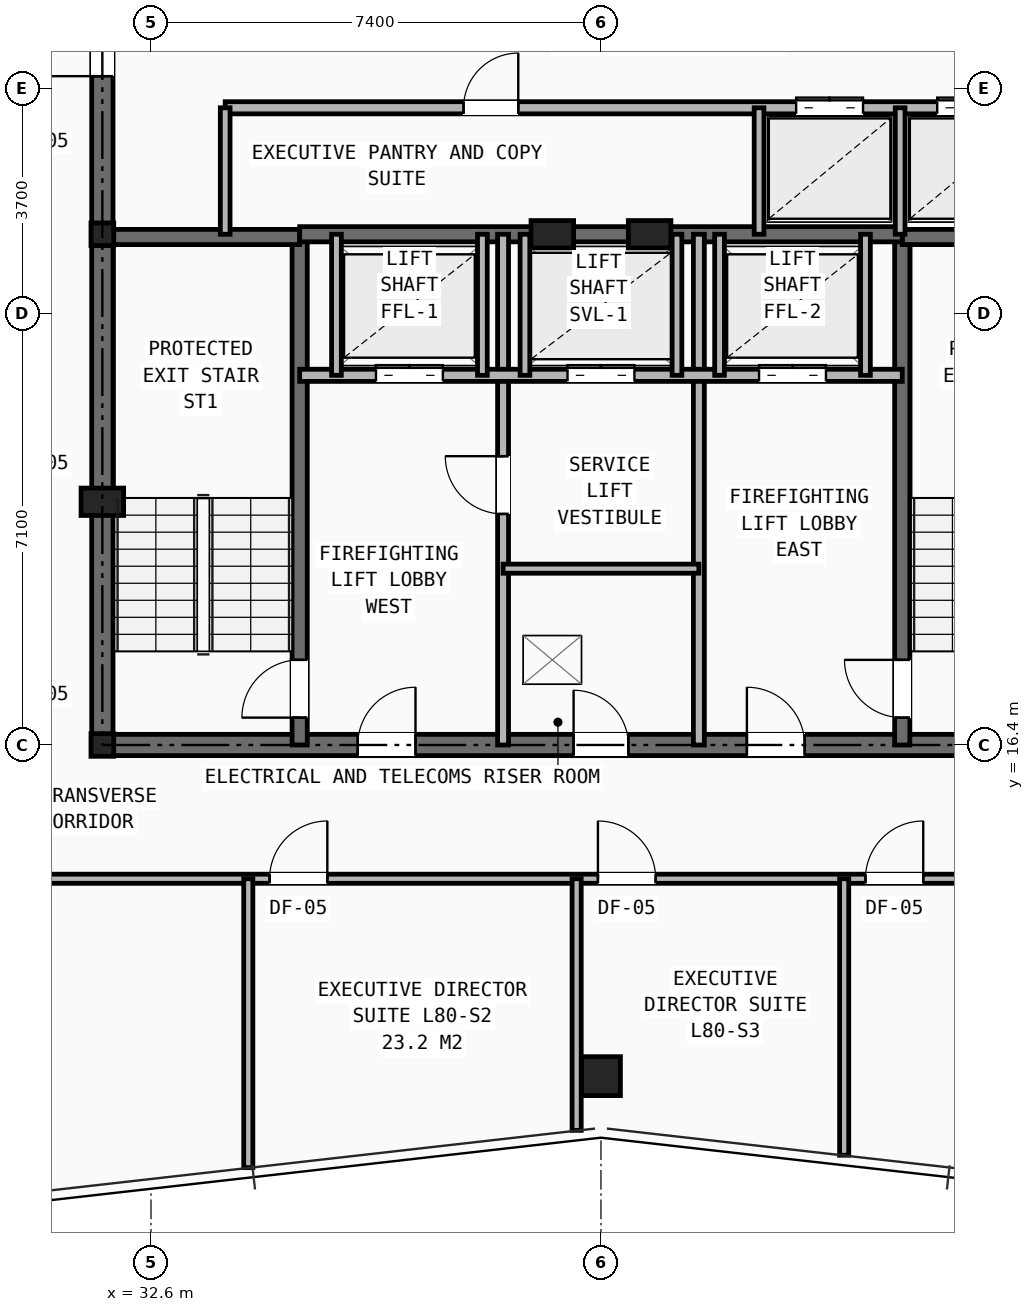
"""IFC4 building model, lengths in metres.
Left out: names, types, materials, properties, quantities, classifications, styles, units other than length and angle.
Written with IfcOpenShell. Run it as: python <this file> out.ifc"""

import sys

from ifc_helpers import new_model, si_unit, direction, frame, frame_2d, origin, origin_2d, place, context, subcontext, project, spatial, rectangle, hollow_rectangle, i_section, extrude, element, fill, save


model = new_model("IFC4")
c1 = context("Model", 3, precision=1e-05, world=origin(), true_north=direction((0.0, 1.0)))
c2 = subcontext(c1, "Body", "Model", "MODEL_VIEW")
j1 = project(units=[si_unit("LENGTHUNIT", "METRE"), si_unit("PLANEANGLEUNIT", "RADIAN")], contexts=[c1])
p1 = place(None, origin())
s1 = spatial("IfcSite", under=j1, at=p1, CompositionType="ELEMENT")
p2 = place(p1, origin())
s2 = spatial("IfcBuilding", under=s1, at=p2, CompositionType="ELEMENT")
p3 = place(p2, frame((0.0, 0.0, 283.0)))
s3 = spatial("IfcBuildingStorey", under=s2, at=p3, CompositionType="ELEMENT", Elevation=283.0)
for number, where, z_axis, x_axis in (
    (1, (31.8, 16.4, 0.0), (0.0, 0.0, 1.0), (1.0, 0.0, 0.0)),
    (2, (31.8, 24.8, 0.0), (0.0, 0.0, 1.0), (1.0, 0.0, 0.0)),
):
    element("IfcColumn", number, at=place(p3, frame(where, z_axis=z_axis, x_axis=x_axis)), inside=s3, PredefinedType="COLUMN", context=c2, shape_type="SweptSolid", body=[
        extrude(i_section(OverallWidth=0.374, OverallDepth=0.372, WebThickness=0.016, FlangeThickness=0.026, at=origin_2d()), origin(), (0.0, 0.0, 1.0), 3.5),
    ])
for number, where, z_axis, x_axis in (
    (3, (31.8, 20.4, 0.0), (0.0, 0.0, 1.0), (1.0, 0.0, 0.0)),
    (4, (39.2, 24.8, 0.0), (0.0, 0.0, 1.0), (1.0, 0.0, 0.0)),
    (5, (40.8, 24.8, 0.0), (0.0, 0.0, 1.0), (1.0, 0.0, 0.0)),
):
    element("IfcColumn", number, at=place(p3, frame(where, z_axis=z_axis, x_axis=x_axis)), inside=s3, PredefinedType="PILASTER", context=c2, shape_type="SweptSolid", body=[
        extrude(rectangle(XDim=0.7, YDim=0.45, at=origin_2d()), origin(), (0.0, 0.0, 1.0), 3.5),
    ])
p4 = place(p3, frame((40.0, 10.953, 0.0), z_axis=(0.0, 0.0, 1.0), x_axis=(1.0, 0.0, 0.0)))
e6 = element("IfcColumn", 6, at=p4, inside=s3, PredefinedType="COLUMN", context=c2, shape_type="SweptSolid", body=[
    extrude(hollow_rectangle(XDim=0.64, YDim=0.64, WallThickness=0.045, at=origin_2d()), origin(), (0.0, 0.0, 1.0), 3.5),
])
p5 = place(p3, frame((31.8, 16.4, 0.0), z_axis=(0.0, 0.0, 1.0), x_axis=(1.0, 0.0, 0.0)))
e7 = element("IfcWall", 7, at=p5, inside=s3, PredefinedType="SHEAR", context=c2, shape_type="SweptSolid", body=[
    extrude(rectangle(XDim=16.4, YDim=0.35, at=frame_2d((8.2, 0.0))), origin(), (0.0, 0.0, 1.0), 3.25),
])
p6 = place(p5, frame((7.75, 0.0, 0.0)))
e8 = element("IfcOpeningElement", 8, at=p6, cuts=e7, PredefinedType="OPENING", context=c2, shape_type="SweptSolid", body=[
    extrude(rectangle(XDim=0.9, YDim=2.1, at=frame_2d((0.45, 1.05))), frame((0.0, 0.185, 0.0), z_axis=(0.0, -1.0, 0.0), x_axis=(1.0, 0.0, 0.0)), (0.0, 0.0, 1.0), 0.37),
])
p7 = place(p5, frame((4.2, 0.0, 0.0)))
e9 = element("IfcOpeningElement", 9, at=p7, cuts=e7, PredefinedType="OPENING", context=c2, shape_type="SweptSolid", body=[
    extrude(rectangle(XDim=0.95, YDim=2.1, at=frame_2d((0.475, 1.05))), frame((0.0, 0.185, 0.0), z_axis=(0.0, -1.0, 0.0), x_axis=(1.0, 0.0, 0.0)), (0.0, 0.0, 1.0), 0.37),
])
p8 = place(p5, frame((10.6, 0.0, 0.0)))
e10 = element("IfcOpeningElement", 10, at=p8, cuts=e7, PredefinedType="OPENING", context=c2, shape_type="SweptSolid", body=[
    extrude(rectangle(XDim=0.95, YDim=2.1, at=frame_2d((0.475, 1.05))), frame((0.0, 0.185, 0.0), z_axis=(0.0, -1.0, 0.0), x_axis=(1.0, 0.0, 0.0)), (0.0, 0.0, 1.0), 0.37),
])
p9 = place(p3, frame((31.8, 16.4, 0.0), z_axis=(0.0, 0.0, 1.0), x_axis=(0.0, 1.0, 0.0)))
e11 = element("IfcWall", 11, at=p9, inside=s3, PredefinedType="SHEAR", context=c2, shape_type="SweptSolid", body=[
    extrude(rectangle(XDim=14.8, YDim=0.35, at=frame_2d((7.4, 0.0))), origin(), (0.0, 0.0, 1.0), 3.25),
])
p10 = place(p9, frame((11.0, 0.0, 0.0)))
e12 = element("IfcOpeningElement", 12, at=p10, cuts=e11, PredefinedType="OPENING", context=c2, shape_type="SweptSolid", body=[
    extrude(rectangle(XDim=1.1, YDim=2.15, at=frame_2d((0.55, 1.075))), frame((0.0, 0.185, 0.0), z_axis=(0.0, -1.0, 0.0), x_axis=(1.0, 0.0, 0.0)), (0.0, 0.0, 1.0), 0.37),
])
p11 = place(p3, frame((35.045, 16.4, 0.0), z_axis=(0.0, 0.0, 1.0), x_axis=(0.0, 1.0, 0.0)))
e13 = element("IfcWall", 13, at=p11, inside=s3, PredefinedType="SHEAR", context=c2, shape_type="SweptSolid", body=[
    extrude(rectangle(XDim=8.4, YDim=0.25, at=frame_2d((4.2, 0.0))), origin(), (0.0, 0.0, 1.0), 3.25),
])
p12 = place(p11, frame((0.45, 0.0, 0.0)))
e14 = element("IfcOpeningElement", 14, at=p12, cuts=e13, PredefinedType="OPENING", context=c2, shape_type="SweptSolid", body=[
    extrude(rectangle(XDim=0.95, YDim=2.1, at=frame_2d((0.475, 1.05))), frame((0.0, 0.135, 0.0), z_axis=(0.0, -1.0, 0.0), x_axis=(1.0, 0.0, 0.0)), (0.0, 0.0, 1.0), 0.27),
])
p13 = place(p3, frame((31.8, 24.755, 0.0), z_axis=(0.0, 0.0, 1.0), x_axis=(1.0, 0.0, 0.0)))
e15 = element("IfcWall", 15, at=p13, inside=s3, PredefinedType="SHEAR", context=c2, shape_type="SweptSolid", body=[
    extrude(rectangle(XDim=3.245, YDim=0.25, at=frame_2d((1.623, 0.0))), origin(), (0.0, 0.0, 1.0), 3.25),
])
p14 = place(p3, frame((44.955, 16.4, 0.0), z_axis=(0.0, 0.0, 1.0), x_axis=(0.0, 1.0, 0.0)))
e16 = element("IfcWall", 16, at=p14, inside=s3, PredefinedType="SHEAR", context=c2, shape_type="SweptSolid", body=[
    extrude(rectangle(XDim=8.4, YDim=0.25, at=frame_2d((4.2, 0.0))), origin(), (0.0, 0.0, 1.0), 3.25),
])
p15 = place(p14, frame((0.45, 0.0, 0.0)))
e17 = element("IfcOpeningElement", 17, at=p15, cuts=e16, PredefinedType="OPENING", context=c2, shape_type="SweptSolid", body=[
    extrude(rectangle(XDim=0.95, YDim=2.1, at=frame_2d((0.475, 1.05))), frame((0.0, 0.135, 0.0), z_axis=(0.0, -1.0, 0.0), x_axis=(1.0, 0.0, 0.0)), (0.0, 0.0, 1.0), 0.27),
])
p16 = place(p3, frame((44.955, 24.755, 0.0), z_axis=(0.0, 0.0, 1.0), x_axis=(1.0, 0.0, 0.0)))
e18 = element("IfcWall", 18, at=p16, inside=s3, PredefinedType="SHEAR", context=c2, shape_type="SweptSolid", body=[
    extrude(rectangle(XDim=3.245, YDim=0.25, at=frame_2d((1.623, 0.0))), origin(), (0.0, 0.0, 1.0), 3.25),
])
p17 = place(p3, frame((35.045, 24.8, 0.0), z_axis=(0.0, 0.0, 1.0), x_axis=(1.0, 0.0, 0.0)))
e19 = element("IfcWall", 19, at=p17, inside=s3, PredefinedType="SHEAR", context=c2, shape_type="SweptSolid", body=[
    extrude(rectangle(XDim=9.91, YDim=0.25, at=frame_2d((4.955, 0.0))), origin(), (0.0, 0.0, 1.0), 3.25),
])
p18 = place(p3, frame((38.39, 16.4, 0.0), z_axis=(0.0, 0.0, 1.0), x_axis=(0.0, 1.0, 0.0)))
e20 = element("IfcWall", 20, at=p18, inside=s3, PredefinedType="PARTITIONING", context=c2, shape_type="SweptSolid", body=[
    extrude(rectangle(XDim=8.4, YDim=0.18, at=frame_2d((4.2, 0.0))), origin(), (0.0, 0.0, 1.0), 2.978),
])
p19 = place(p18, frame((3.8, 0.0, 0.0)))
e21 = element("IfcOpeningElement", 21, at=p19, cuts=e20, PredefinedType="OPENING", context=c2, shape_type="SweptSolid", body=[
    extrude(rectangle(XDim=0.95, YDim=2.1, at=frame_2d((0.475, 1.05))), frame((0.0, 0.1, 0.0), z_axis=(0.0, -1.0, 0.0), x_axis=(1.0, 0.0, 0.0)), (0.0, 0.0, 1.0), 0.2),
])
p20 = place(p3, frame((41.61, 16.4, 0.0), z_axis=(0.0, 0.0, 1.0), x_axis=(0.0, 1.0, 0.0)))
e22 = element("IfcWall", 22, at=p20, inside=s3, PredefinedType="PARTITIONING", context=c2, shape_type="SweptSolid", body=[
    extrude(rectangle(XDim=8.4, YDim=0.18, at=frame_2d((4.2, 0.0))), origin(), (0.0, 0.0, 1.0), 2.978),
])
p21 = place(p3, frame((35.045, 22.48, 0.0), z_axis=(0.0, 0.0, 1.0), x_axis=(1.0, 0.0, 0.0)))
e23 = element("IfcWall", 23, at=p21, inside=s3, PredefinedType="SOLIDWALL", context=c2, shape_type="SweptSolid", body=[
    extrude(rectangle(XDim=9.91, YDim=0.2, at=frame_2d((4.955, 0.0))), origin(), (0.0, 0.0, 1.0), 3.25),
])
p22 = place(p21, frame((1.255, 0.0, 0.0)))
e24 = element("IfcOpeningElement", 24, at=p22, cuts=e23, PredefinedType="OPENING", context=c2, shape_type="SweptSolid", body=[
    extrude(rectangle(XDim=1.1, YDim=2.15, at=frame_2d((0.55, 1.075))), frame((0.0, 0.11, 0.0), z_axis=(0.0, -1.0, 0.0), x_axis=(1.0, 0.0, 0.0)), (0.0, 0.0, 1.0), 0.22),
])
p23 = place(p21, frame((7.555, 0.0, 0.0)))
e25 = element("IfcOpeningElement", 25, at=p23, cuts=e23, PredefinedType="OPENING", context=c2, shape_type="SweptSolid", body=[
    extrude(rectangle(XDim=1.1, YDim=2.15, at=frame_2d((0.55, 1.075))), frame((0.0, 0.11, 0.0), z_axis=(0.0, -1.0, 0.0), x_axis=(1.0, 0.0, 0.0)), (0.0, 0.0, 1.0), 0.22),
])
p24 = place(p21, frame((4.405, 0.0, 0.0)))
e26 = element("IfcOpeningElement", 26, at=p24, cuts=e23, PredefinedType="OPENING", context=c2, shape_type="SweptSolid", body=[
    extrude(rectangle(XDim=1.1, YDim=2.15, at=frame_2d((0.55, 1.075))), frame((0.0, 0.11, 0.0), z_axis=(0.0, -1.0, 0.0), x_axis=(1.0, 0.0, 0.0)), (0.0, 0.0, 1.0), 0.22),
])
p25 = place(p3, frame((38.39, 19.3, 0.0), z_axis=(0.0, 0.0, 1.0), x_axis=(1.0, 0.0, 0.0)))
e27 = element("IfcWall", 27, at=p25, inside=s3, PredefinedType="PARTITIONING", context=c2, shape_type="SweptSolid", body=[
    extrude(rectangle(XDim=3.22, YDim=0.15, at=frame_2d((1.61, 0.0))), origin(), (0.0, 0.0, 1.0), 3.25),
])
for number, where, z_axis, x_axis in (
    (28, (35.65, 22.48, 0.0), (0.0, 0.0, 1.0), (0.0, 1.0, 0.0)),
    (29, (38.05, 22.48, 0.0), (0.0, 0.0, 1.0), (0.0, 1.0, 0.0)),
    (30, (41.95, 22.48, 0.0), (0.0, 0.0, 1.0), (0.0, 1.0, 0.0)),
    (31, (44.35, 22.48, 0.0), (0.0, 0.0, 1.0), (0.0, 1.0, 0.0)),
    (32, (38.75, 22.48, 0.0), (0.0, 0.0, 1.0), (0.0, 1.0, 0.0)),
    (33, (41.25, 22.48, 0.0), (0.0, 0.0, 1.0), (0.0, 1.0, 0.0)),
):
    element("IfcWall", number, at=place(p3, frame(where, z_axis=z_axis, x_axis=x_axis)), inside=s3, PredefinedType="SOLIDWALL", context=c2, shape_type="SweptSolid", body=[
        extrude(rectangle(XDim=2.32, YDim=0.16, at=frame_2d((1.16, 0.0))), origin(), (0.0, 0.0, 1.0), 3.25),
    ])
p26 = place(p3, frame((33.82, 26.88, 0.0), z_axis=(0.0, 0.0, 1.0), x_axis=(1.0, 0.0, 0.0)))
e34 = element("IfcWall", 34, at=p26, inside=s3, PredefinedType="SOLIDWALL", context=c2, shape_type="SweptSolid", body=[
    extrude(rectangle(XDim=14.38, YDim=0.2, at=frame_2d((7.19, 0.0))), origin(), (0.0, 0.0, 1.0), 2.705),
])
p27 = place(p26, frame((3.92, 0.0, 0.0)))
e35 = element("IfcOpeningElement", 35, at=p27, cuts=e34, PredefinedType="OPENING", context=c2, shape_type="SweptSolid", body=[
    extrude(rectangle(XDim=0.9, YDim=2.1, at=frame_2d((0.45, 1.05))), frame((0.0, 0.11, 0.0), z_axis=(0.0, -1.0, 0.0), x_axis=(1.0, 0.0, 0.0)), (0.0, 0.0, 1.0), 0.22),
])
p28 = place(p26, frame((9.39, 0.0, 0.0)))
e36 = element("IfcOpeningElement", 36, at=p28, cuts=e34, PredefinedType="OPENING", context=c2, shape_type="SweptSolid", body=[
    extrude(rectangle(XDim=1.1, YDim=2.15, at=frame_2d((0.55, 1.075))), frame((0.0, 0.11, 0.0), z_axis=(0.0, -1.0, 0.0), x_axis=(1.0, 0.0, 0.0)), (0.0, 0.0, 1.0), 0.22),
])
p29 = place(p26, frame((11.71, 0.0, 0.0)))
e37 = element("IfcOpeningElement", 37, at=p29, cuts=e34, PredefinedType="OPENING", context=c2, shape_type="SweptSolid", body=[
    extrude(rectangle(XDim=1.1, YDim=2.15, at=frame_2d((0.55, 1.075))), frame((0.0, 0.11, 0.0), z_axis=(0.0, -1.0, 0.0), x_axis=(1.0, 0.0, 0.0)), (0.0, 0.0, 1.0), 0.22),
])
for number, where, z_axis, x_axis in (
    (38, (33.82, 24.8, 0.0), (0.0, 0.0, 1.0), (0.0, 1.0, 0.0)),
    (39, (42.6, 24.8, 0.0), (0.0, 0.0, 1.0), (0.0, 1.0, 0.0)),
    (40, (44.92, 24.8, 0.0), (0.0, 0.0, 1.0), (0.0, 1.0, 0.0)),
):
    element("IfcWall", number, at=place(p3, frame(where, z_axis=z_axis, x_axis=x_axis)), inside=s3, PredefinedType="SOLIDWALL", context=c2, shape_type="SweptSolid", body=[
        extrude(rectangle(XDim=2.08, YDim=0.16, at=frame_2d((1.04, 0.0))), origin(), (0.0, 0.0, 1.0), 3.25),
    ])
p30 = place(p3, frame((25.5, 14.2, 0.0), z_axis=(0.0, 0.0, 1.0), x_axis=(1.0, 0.0, 0.0)))
e41 = element("IfcWall", 41, at=p30, inside=s3, PredefinedType="PARTITIONING", context=c2, shape_type="SweptSolid", body=[
    extrude(rectangle(XDim=29.0, YDim=0.15, at=frame_2d((14.5, 0.0))), origin(), (0.0, 0.0, 1.0), 2.265),
])
p31 = place(p30, frame((0.85, 0.0, 0.0)))
e42 = element("IfcOpeningElement", 42, at=p31, cuts=e41, PredefinedType="OPENING", context=c2, shape_type="SweptSolid", body=[
    extrude(rectangle(XDim=0.95, YDim=2.1, at=frame_2d((0.475, 1.05))), frame((0.0, 0.085, 0.0), z_axis=(0.0, -1.0, 0.0), x_axis=(1.0, 0.0, 0.0)), (0.0, 0.0, 1.0), 0.17),
])
p32 = place(p30, frame((9.05, 0.0, 0.0)))
e43 = element("IfcOpeningElement", 43, at=p32, cuts=e41, PredefinedType="OPENING", context=c2, shape_type="SweptSolid", body=[
    extrude(rectangle(XDim=0.95, YDim=2.1, at=frame_2d((0.475, 1.05))), frame((0.0, 0.085, 0.0), z_axis=(0.0, -1.0, 0.0), x_axis=(1.0, 0.0, 0.0)), (0.0, 0.0, 1.0), 0.17),
])
p33 = place(p30, frame((14.45, 0.0, 0.0)))
e44 = element("IfcOpeningElement", 44, at=p33, cuts=e41, PredefinedType="OPENING", context=c2, shape_type="SweptSolid", body=[
    extrude(rectangle(XDim=0.95, YDim=2.1, at=frame_2d((0.475, 1.05))), frame((0.0, 0.085, 0.0), z_axis=(0.0, -1.0, 0.0), x_axis=(1.0, 0.0, 0.0)), (0.0, 0.0, 1.0), 0.17),
])
p34 = place(p30, frame((18.85, 0.0, 0.0)))
e45 = element("IfcOpeningElement", 45, at=p34, cuts=e41, PredefinedType="OPENING", context=c2, shape_type="SweptSolid", body=[
    extrude(rectangle(XDim=0.95, YDim=2.1, at=frame_2d((0.475, 1.05))), frame((0.0, 0.085, 0.0), z_axis=(0.0, -1.0, 0.0), x_axis=(1.0, 0.0, 0.0)), (0.0, 0.0, 1.0), 0.17),
])
p35 = place(p3, frame((34.2, 9.449, 0.0), z_axis=(0.0, 0.0, 1.0), x_axis=(0.0, 1.0, 0.0)))
e46 = element("IfcWall", 46, at=p35, inside=s3, PredefinedType="PARTITIONING", context=c2, shape_type="SweptSolid", body=[
    extrude(rectangle(XDim=4.751, YDim=0.15, at=frame_2d((2.375, 0.0))), origin(), (0.0, 0.0, 1.0), 2.628),
])
p36 = place(p3, frame((39.6, 10.062, 0.0), z_axis=(0.0, 0.0, 1.0), x_axis=(0.0, 1.0, 0.0)))
e47 = element("IfcWall", 47, at=p36, inside=s3, PredefinedType="PARTITIONING", context=c2, shape_type="SweptSolid", body=[
    extrude(rectangle(XDim=4.138, YDim=0.15, at=frame_2d((2.069, 0.0))), origin(), (0.0, 0.0, 1.0), 2.265),
])
p37 = place(p3, frame((44.0, 9.653, 0.0), z_axis=(0.0, 0.0, 1.0), x_axis=(0.0, 1.0, 0.0)))
e48 = element("IfcWall", 48, at=p37, inside=s3, PredefinedType="PARTITIONING", context=c2, shape_type="SweptSolid", body=[
    extrude(rectangle(XDim=4.547, YDim=0.15, at=frame_2d((2.273, 0.0))), origin(), (0.0, 0.0, 1.0), 2.628),
])
p38 = place(p6, origin())
e49 = element("IfcDoor", 49, at=p38, inside=s3, OperationType="SINGLE_SWING_LEFT", PredefinedType="DOOR", context=c2, shape_type="SweptSolid", body=[
    extrude(rectangle(XDim=0.9, YDim=2.1, at=frame_2d((0.45, 1.05))), frame((0.0, 0.025, 0.0), z_axis=(0.0, -1.0, 0.0), x_axis=(1.0, 0.0, 0.0)), (0.0, 0.0, 1.0), 0.05),
])
fill(e8, e49)
p39 = place(p19, origin())
e50 = element("IfcDoor", 50, at=p39, inside=s3, OperationType="SINGLE_SWING_RIGHT", PredefinedType="DOOR", context=c2, shape_type="SweptSolid", body=[
    extrude(rectangle(XDim=0.95, YDim=2.1, at=frame_2d((0.475, 1.05))), frame((0.0, 0.025, 0.0), z_axis=(0.0, -1.0, 0.0), x_axis=(1.0, 0.0, 0.0)), (0.0, 0.0, 1.0), 0.05),
])
fill(e21, e50)
p40 = place(p12, origin())
e51 = element("IfcDoor", 51, at=p40, inside=s3, OperationType="SINGLE_SWING_LEFT", PredefinedType="DOOR", context=c2, shape_type="SweptSolid", body=[
    extrude(rectangle(XDim=0.95, YDim=2.1, at=frame_2d((0.475, 1.05))), frame((0.0, 0.025, 0.0), z_axis=(0.0, -1.0, 0.0), x_axis=(1.0, 0.0, 0.0)), (0.0, 0.0, 1.0), 0.05),
])
fill(e14, e51)
p41 = place(p15, origin())
e52 = element("IfcDoor", 52, at=p41, inside=s3, OperationType="SINGLE_SWING_RIGHT", PredefinedType="DOOR", context=c2, shape_type="SweptSolid", body=[
    extrude(rectangle(XDim=0.95, YDim=2.1, at=frame_2d((0.475, 1.05))), frame((0.0, 0.025, 0.0), z_axis=(0.0, -1.0, 0.0), x_axis=(1.0, 0.0, 0.0)), (0.0, 0.0, 1.0), 0.05),
])
fill(e17, e52)
p42 = place(p7, origin())
e53 = element("IfcDoor", 53, at=p42, inside=s3, OperationType="SINGLE_SWING_RIGHT", PredefinedType="DOOR", context=c2, shape_type="SweptSolid", body=[
    extrude(rectangle(XDim=0.95, YDim=2.1, at=frame_2d((0.475, 1.05))), frame((0.0, 0.025, 0.0), z_axis=(0.0, -1.0, 0.0), x_axis=(1.0, 0.0, 0.0)), (0.0, 0.0, 1.0), 0.05),
])
fill(e9, e53)
p43 = place(p8, origin())
e54 = element("IfcDoor", 54, at=p43, inside=s3, OperationType="SINGLE_SWING_LEFT", PredefinedType="DOOR", context=c2, shape_type="SweptSolid", body=[
    extrude(rectangle(XDim=0.95, YDim=2.1, at=frame_2d((0.475, 1.05))), frame((0.0, 0.025, 0.0), z_axis=(0.0, -1.0, 0.0), x_axis=(1.0, 0.0, 0.0)), (0.0, 0.0, 1.0), 0.05),
])
fill(e10, e54)
p44 = place(p22, origin())
e55 = element("IfcDoor", 55, at=p44, inside=s3, OperationType="DOUBLE_DOOR_SLIDING", PredefinedType="DOOR", context=c2, shape_type="SweptSolid", body=[
    extrude(rectangle(XDim=1.1, YDim=2.15, at=frame_2d((0.55, 1.075))), frame((0.0, 0.025, 0.0), z_axis=(0.0, -1.0, 0.0), x_axis=(1.0, 0.0, 0.0)), (0.0, 0.0, 1.0), 0.05),
])
fill(e24, e55)
p45 = place(p23, origin())
e56 = element("IfcDoor", 56, at=p45, inside=s3, OperationType="DOUBLE_DOOR_SLIDING", PredefinedType="DOOR", context=c2, shape_type="SweptSolid", body=[
    extrude(rectangle(XDim=1.1, YDim=2.15, at=frame_2d((0.55, 1.075))), frame((0.0, 0.025, 0.0), z_axis=(0.0, -1.0, 0.0), x_axis=(1.0, 0.0, 0.0)), (0.0, 0.0, 1.0), 0.05),
])
fill(e25, e56)
p46 = place(p24, origin())
e57 = element("IfcDoor", 57, at=p46, inside=s3, OperationType="DOUBLE_DOOR_SLIDING", PredefinedType="DOOR", context=c2, shape_type="SweptSolid", body=[
    extrude(rectangle(XDim=1.1, YDim=2.15, at=frame_2d((0.55, 1.075))), frame((0.0, 0.025, 0.0), z_axis=(0.0, -1.0, 0.0), x_axis=(1.0, 0.0, 0.0)), (0.0, 0.0, 1.0), 0.05),
])
fill(e26, e57)
p47 = place(p10, origin())
e58 = element("IfcDoor", 58, at=p47, inside=s3, OperationType="SINGLE_SWING_LEFT", PredefinedType="DOOR", context=c2, shape_type="SweptSolid", body=[
    extrude(rectangle(XDim=1.1, YDim=2.15, at=frame_2d((0.55, 1.075))), frame((0.0, 0.025, 0.0), z_axis=(0.0, -1.0, 0.0), x_axis=(1.0, 0.0, 0.0)), (0.0, 0.0, 1.0), 0.05),
])
fill(e12, e58)
p48 = place(p27, origin())
e59 = element("IfcDoor", 59, at=p48, inside=s3, OperationType="SINGLE_SWING_RIGHT", PredefinedType="DOOR", context=c2, shape_type="SweptSolid", body=[
    extrude(rectangle(XDim=0.9, YDim=2.1, at=frame_2d((0.45, 1.05))), frame((0.0, 0.025, 0.0), z_axis=(0.0, -1.0, 0.0), x_axis=(1.0, 0.0, 0.0)), (0.0, 0.0, 1.0), 0.05),
])
fill(e35, e59)
p49 = place(p28, origin())
e60 = element("IfcDoor", 60, at=p49, inside=s3, OperationType="DOUBLE_DOOR_SLIDING", PredefinedType="DOOR", context=c2, shape_type="SweptSolid", body=[
    extrude(rectangle(XDim=1.1, YDim=2.15, at=frame_2d((0.55, 1.075))), frame((0.0, 0.025, 0.0), z_axis=(0.0, -1.0, 0.0), x_axis=(1.0, 0.0, 0.0)), (0.0, 0.0, 1.0), 0.05),
])
fill(e36, e60)
p50 = place(p29, origin())
e61 = element("IfcDoor", 61, at=p50, inside=s3, OperationType="DOUBLE_DOOR_SLIDING", PredefinedType="DOOR", context=c2, shape_type="SweptSolid", body=[
    extrude(rectangle(XDim=1.1, YDim=2.15, at=frame_2d((0.55, 1.075))), frame((0.0, 0.025, 0.0), z_axis=(0.0, -1.0, 0.0), x_axis=(1.0, 0.0, 0.0)), (0.0, 0.0, 1.0), 0.05),
])
fill(e37, e61)
p51 = place(p32, origin())
e62 = element("IfcDoor", 62, at=p51, inside=s3, OperationType="SINGLE_SWING_RIGHT", PredefinedType="DOOR", context=c2, shape_type="SweptSolid", body=[
    extrude(rectangle(XDim=0.95, YDim=2.1, at=frame_2d((0.475, 1.05))), frame((0.0, 0.025, 0.0), z_axis=(0.0, -1.0, 0.0), x_axis=(1.0, 0.0, 0.0)), (0.0, 0.0, 1.0), 0.05),
])
fill(e43, e62)
p52 = place(p33, origin())
e63 = element("IfcDoor", 63, at=p52, inside=s3, OperationType="SINGLE_SWING_LEFT", PredefinedType="DOOR", context=c2, shape_type="SweptSolid", body=[
    extrude(rectangle(XDim=0.95, YDim=2.1, at=frame_2d((0.475, 1.05))), frame((0.0, 0.025, 0.0), z_axis=(0.0, -1.0, 0.0), x_axis=(1.0, 0.0, 0.0)), (0.0, 0.0, 1.0), 0.05),
])
fill(e44, e63)
p53 = place(p34, origin())
e64 = element("IfcDoor", 64, at=p53, inside=s3, OperationType="SINGLE_SWING_RIGHT", PredefinedType="DOOR", context=c2, shape_type="SweptSolid", body=[
    extrude(rectangle(XDim=0.95, YDim=2.1, at=frame_2d((0.475, 1.05))), frame((0.0, 0.025, 0.0), z_axis=(0.0, -1.0, 0.0), x_axis=(1.0, 0.0, 0.0)), (0.0, 0.0, 1.0), 0.05),
])
fill(e45, e64)
save(model, sys.argv[1])
